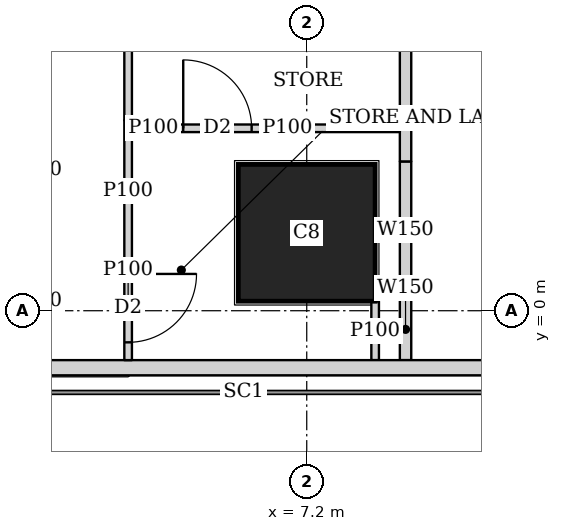
"""IFC4 building model, lengths in metres.
Left out: names, types, materials, properties, quantities, classifications, styles, units other than length and angle.
Written with IfcOpenShell. Run it as: python <this file> out.ifc"""

import sys

from ifc_helpers import new_model, si_unit, direction, frame, frame_2d, origin, origin_2d, place, context, subcontext, project, spatial, rectangle, extrude, element, fill, save


model = new_model("IFC4")
c1 = context("Model", 3, precision=1e-05, world=origin(), true_north=direction((0.0, 1.0)))
c2 = subcontext(c1, "Body", "Model", "MODEL_VIEW")
j1 = project(units=[si_unit("LENGTHUNIT", "METRE"), si_unit("PLANEANGLEUNIT", "RADIAN")], contexts=[c1])
p1 = place(None, origin())
s1 = spatial("IfcSite", under=j1, at=p1, CompositionType="ELEMENT")
p2 = place(p1, origin())
s2 = spatial("IfcBuilding", under=s1, at=p2, CompositionType="ELEMENT")
p3 = place(p2, frame((0.0, 0.0, 180.8)))
s3 = spatial("IfcBuildingStorey", under=s2, at=p3, CompositionType="ELEMENT", Elevation=180.8)
p4 = place(p3, frame((7.2, 1.025, 0.0), z_axis=(0.0, 0.0, 1.0), x_axis=(1.0, 0.0, 0.0)))
e1 = element("IfcColumn", 1, at=p4, inside=s3, PredefinedType="COLUMN", context=c2, shape_type="SweptSolid", body=[
    extrude(rectangle(XDim=1.8, YDim=1.8, at=origin_2d()), origin(), (0.0, 0.0, 1.0), 3.75),
])
p5 = place(p3, frame((2.163, -0.75, 0.0), z_axis=(0.0, 0.0, 1.0), x_axis=(1.0, 0.0, 0.0)))
e2 = element("IfcWall", 2, at=p5, inside=s3, PredefinedType="SOLIDWALL", context=c2, shape_type="SweptSolid", body=[
    extrude(rectangle(XDim=45.628, YDim=0.2, at=frame_2d((22.814, 0.0))), origin(), (0.0, 0.0, 1.0), 3.5),
])
p6 = place(p5, frame((9.537, 0.0, 0.9)))
e3 = element("IfcOpeningElement", 3, at=p6, cuts=e2, PredefinedType="OPENING", context=c2, shape_type="SweptSolid", body=[
    extrude(rectangle(XDim=1.8, YDim=1.5, at=frame_2d((0.9, 0.75))), frame((0.0, 0.11, 0.0), z_axis=(0.0, -1.0, 0.0), x_axis=(1.0, 0.0, 0.0)), (0.0, 0.0, 1.0), 0.22),
])
p7 = place(p5, frame((13.137, 0.0, 0.9)))
e4 = element("IfcOpeningElement", 4, at=p7, cuts=e2, PredefinedType="OPENING", context=c2, shape_type="SweptSolid", body=[
    extrude(rectangle(XDim=1.8, YDim=1.5, at=frame_2d((0.9, 0.75))), frame((0.0, 0.11, 0.0), z_axis=(0.0, -1.0, 0.0), x_axis=(1.0, 0.0, 0.0)), (0.0, 0.0, 1.0), 0.22),
])
p8 = place(p5, frame((16.737, 0.0, 0.9)))
e5 = element("IfcOpeningElement", 5, at=p8, cuts=e2, PredefinedType="OPENING", context=c2, shape_type="SweptSolid", body=[
    extrude(rectangle(XDim=1.8, YDim=1.5, at=frame_2d((0.9, 0.75))), frame((0.0, 0.11, 0.0), z_axis=(0.0, -1.0, 0.0), x_axis=(1.0, 0.0, 0.0)), (0.0, 0.0, 1.0), 0.22),
])
p9 = place(p5, frame((20.337, 0.0, 0.9)))
e6 = element("IfcOpeningElement", 6, at=p9, cuts=e2, PredefinedType="OPENING", context=c2, shape_type="SweptSolid", body=[
    extrude(rectangle(XDim=1.8, YDim=1.5, at=frame_2d((0.9, 0.75))), frame((0.0, 0.11, 0.0), z_axis=(0.0, -1.0, 0.0), x_axis=(1.0, 0.0, 0.0)), (0.0, 0.0, 1.0), 0.22),
])
p10 = place(p5, frame((23.937, 0.0, 0.9)))
e7 = element("IfcOpeningElement", 7, at=p10, cuts=e2, PredefinedType="OPENING", context=c2, shape_type="SweptSolid", body=[
    extrude(rectangle(XDim=1.8, YDim=1.5, at=frame_2d((0.9, 0.75))), frame((0.0, 0.11, 0.0), z_axis=(0.0, -1.0, 0.0), x_axis=(1.0, 0.0, 0.0)), (0.0, 0.0, 1.0), 0.22),
])
p11 = place(p5, frame((27.537, 0.0, 0.9)))
e8 = element("IfcOpeningElement", 8, at=p11, cuts=e2, PredefinedType="OPENING", context=c2, shape_type="SweptSolid", body=[
    extrude(rectangle(XDim=1.8, YDim=1.5, at=frame_2d((0.9, 0.75))), frame((0.0, 0.11, 0.0), z_axis=(0.0, -1.0, 0.0), x_axis=(1.0, 0.0, 0.0)), (0.0, 0.0, 1.0), 0.22),
])
p12 = place(p5, frame((31.137, 0.0, 0.9)))
e9 = element("IfcOpeningElement", 9, at=p12, cuts=e2, PredefinedType="OPENING", context=c2, shape_type="SweptSolid", body=[
    extrude(rectangle(XDim=1.8, YDim=1.5, at=frame_2d((0.9, 0.75))), frame((0.0, 0.11, 0.0), z_axis=(0.0, -1.0, 0.0), x_axis=(1.0, 0.0, 0.0)), (0.0, 0.0, 1.0), 0.22),
])
p13 = place(p5, frame((34.737, 0.0, 0.9)))
e10 = element("IfcOpeningElement", 10, at=p13, cuts=e2, PredefinedType="OPENING", context=c2, shape_type="SweptSolid", body=[
    extrude(rectangle(XDim=1.8, YDim=1.5, at=frame_2d((0.9, 0.75))), frame((0.0, 0.11, 0.0), z_axis=(0.0, -1.0, 0.0), x_axis=(1.0, 0.0, 0.0)), (0.0, 0.0, 1.0), 0.22),
])
p14 = place(p3, frame((8.5, -0.65, 0.0), z_axis=(0.0, 0.0, 1.0), x_axis=(0.0, 1.0, 0.0)))
e11 = element("IfcWall", 11, at=p14, inside=s3, PredefinedType="SOLIDWALL", context=c2, shape_type="SweptSolid", body=[
    extrude(rectangle(XDim=0.809, YDim=0.15, at=frame_2d((0.404, 0.0))), origin(), (0.0, 0.0, 1.0), 3.5),
])
p15 = place(p3, frame((8.5, 0.159, 0.0), z_axis=(0.0, 0.0, 1.0), x_axis=(0.0, 1.0, 0.0)))
e12 = element("IfcWall", 12, at=p15, inside=s3, PredefinedType="SOLIDWALL", context=c2, shape_type="SweptSolid", body=[
    extrude(rectangle(XDim=1.805, YDim=0.15, at=frame_2d((0.903, 0.0))), origin(), (0.0, 0.0, 1.0), 2.1),
])
p16 = place(p3, frame((8.5, 1.964, 0.0), z_axis=(0.0, 0.0, 1.0), x_axis=(0.0, 1.0, 0.0)))
e13 = element("IfcWall", 13, at=p16, inside=s3, PredefinedType="SOLIDWALL", context=c2, shape_type="SweptSolid", body=[
    extrude(rectangle(XDim=41.097, YDim=0.15, at=frame_2d((20.548, 0.0))), origin(), (0.0, 0.0, 1.0), 3.5),
])
p17 = place(p16, frame((10.661, 0.0, 0.0)))
e14 = element("IfcOpeningElement", 14, at=p17, cuts=e13, PredefinedType="OPENING", context=c2, shape_type="SweptSolid", body=[
    extrude(rectangle(XDim=1.0, YDim=2.1, at=frame_2d((0.5, 1.05))), frame((0.0, 0.085, 0.0), z_axis=(0.0, -1.0, 0.0), x_axis=(1.0, 0.0, 0.0)), (0.0, 0.0, 1.0), 0.17),
])
p18 = place(p16, frame((14.411, 0.0, 0.0)))
e15 = element("IfcOpeningElement", 15, at=p18, cuts=e13, PredefinedType="OPENING", context=c2, shape_type="SweptSolid", body=[
    extrude(rectangle(XDim=1.0, YDim=2.1, at=frame_2d((0.5, 1.05))), frame((0.0, 0.085, 0.0), z_axis=(0.0, -1.0, 0.0), x_axis=(1.0, 0.0, 0.0)), (0.0, 0.0, 1.0), 0.17),
])
p19 = place(p16, frame((21.911, 0.0, 0.0)))
e16 = element("IfcOpeningElement", 16, at=p19, cuts=e13, PredefinedType="OPENING", context=c2, shape_type="SweptSolid", body=[
    extrude(rectangle(XDim=1.0, YDim=2.1, at=frame_2d((0.5, 1.05))), frame((0.0, 0.085, 0.0), z_axis=(0.0, -1.0, 0.0), x_axis=(1.0, 0.0, 0.0)), (0.0, 0.0, 1.0), 0.17),
])
p20 = place(p16, frame((33.161, 0.0, 0.0)))
e17 = element("IfcOpeningElement", 17, at=p20, cuts=e13, PredefinedType="OPENING", context=c2, shape_type="SweptSolid", body=[
    extrude(rectangle(XDim=1.0, YDim=2.1, at=frame_2d((0.5, 1.05))), frame((0.0, 0.085, 0.0), z_axis=(0.0, -1.0, 0.0), x_axis=(1.0, 0.0, 0.0)), (0.0, 0.0, 1.0), 0.17),
])
p21 = place(p3, frame((8.1, 0.124, 0.0), z_axis=(0.0, 0.0, 1.0), x_axis=(0.0, -1.0, 0.0)))
e18 = element("IfcWall", 18, at=p21, inside=s3, PredefinedType="PARTITIONING", context=c2, shape_type="SweptSolid", body=[
    extrude(rectangle(XDim=0.774, YDim=0.1, at=frame_2d((0.387, 0.0))), origin(), (0.0, 0.0, 1.0), 3.5),
])
p22 = place(p3, frame((4.85, -0.65, 0.0), z_axis=(0.0, 0.0, 1.0), x_axis=(0.0, 1.0, 0.0)))
e19 = element("IfcWall", 19, at=p22, inside=s3, PredefinedType="PARTITIONING", context=c2, shape_type="SweptSolid", body=[
    extrude(rectangle(XDim=1.284, YDim=0.1, at=frame_2d((0.642, 0.0))), origin(), (0.0, 0.0, 1.0), 3.5),
])
p23 = place(p22, frame((0.234, 0.0, 0.0)))
e20 = element("IfcOpeningElement", 20, at=p23, cuts=e19, PredefinedType="OPENING", context=c2, shape_type="SweptSolid", body=[
    extrude(rectangle(XDim=0.9, YDim=2.1, at=frame_2d((0.45, 1.05))), frame((0.0, 0.06, 0.0), z_axis=(0.0, -1.0, 0.0), x_axis=(1.0, 0.0, 0.0)), (0.0, 0.0, 1.0), 0.12),
])
p24 = place(p3, frame((4.85, 0.634, 0.0), z_axis=(0.0, 0.0, 1.0), x_axis=(0.0, 1.0, 0.0)))
e21 = element("IfcWall", 21, at=p24, inside=s3, PredefinedType="PARTITIONING", context=c2, shape_type="SweptSolid", body=[
    extrude(rectangle(XDim=1.871, YDim=0.1, at=frame_2d((0.936, 0.0))), origin(), (0.0, 0.0, 1.0), 2.1),
])
p25 = place(p3, frame((4.85, 2.505, 0.0), z_axis=(0.0, 0.0, 1.0), x_axis=(0.0, 1.0, 0.0)))
e22 = element("IfcWall", 22, at=p25, inside=s3, PredefinedType="PARTITIONING", context=c2, shape_type="SweptSolid", body=[
    extrude(rectangle(XDim=8.745, YDim=0.1, at=frame_2d((4.373, 0.0))), origin(), (0.0, 0.0, 1.0), 3.5),
])
p26 = place(p25, frame((7.27, 0.0, 0.0)))
e23 = element("IfcOpeningElement", 23, at=p26, cuts=e22, PredefinedType="OPENING", context=c2, shape_type="SweptSolid", body=[
    extrude(rectangle(XDim=0.9, YDim=2.1, at=frame_2d((0.45, 1.05))), frame((0.0, 0.06, 0.0), z_axis=(0.0, -1.0, 0.0), x_axis=(1.0, 0.0, 0.0)), (0.0, 0.0, 1.0), 0.12),
])
p27 = place(p25, frame((3.745, 0.0, 0.0)))
e24 = element("IfcOpeningElement", 24, at=p27, cuts=e22, PredefinedType="OPENING", context=c2, shape_type="SweptSolid", body=[
    extrude(rectangle(XDim=0.9, YDim=2.1, at=frame_2d((0.45, 1.05))), frame((0.0, 0.06, 0.0), z_axis=(0.0, -1.0, 0.0), x_axis=(1.0, 0.0, 0.0)), (0.0, 0.0, 1.0), 0.12),
])
p28 = place(p25, frame((5.395, 0.0, 0.0)))
e25 = element("IfcOpeningElement", 25, at=p28, cuts=e22, PredefinedType="OPENING", context=c2, shape_type="SweptSolid", body=[
    extrude(rectangle(XDim=0.9, YDim=2.1, at=frame_2d((0.45, 1.05))), frame((0.0, 0.06, 0.0), z_axis=(0.0, -1.0, 0.0), x_axis=(1.0, 0.0, 0.0)), (0.0, 0.0, 1.0), 0.12),
])
p29 = place(p25, frame((1.87, 0.0, 0.0)))
e26 = element("IfcOpeningElement", 26, at=p29, cuts=e22, PredefinedType="OPENING", context=c2, shape_type="SweptSolid", body=[
    extrude(rectangle(XDim=0.9, YDim=2.1, at=frame_2d((0.45, 1.05))), frame((0.0, 0.06, 0.0), z_axis=(0.0, -1.0, 0.0), x_axis=(1.0, 0.0, 0.0)), (0.0, 0.0, 1.0), 0.12),
])
p30 = place(p3, frame((5.467, 2.4, 0.0), z_axis=(0.0, 0.0, 1.0), x_axis=(1.0, 0.0, 0.0)))
e27 = element("IfcWall", 27, at=p30, inside=s3, PredefinedType="PARTITIONING", context=c2, shape_type="SweptSolid", body=[
    extrude(rectangle(XDim=2.958, YDim=0.1, at=frame_2d((1.479, 0.0))), origin(), (0.0, 0.0, 1.0), 3.5),
])
p31 = place(p30, frame((0.108, 0.0, 0.0)))
e28 = element("IfcOpeningElement", 28, at=p31, cuts=e27, PredefinedType="OPENING", context=c2, shape_type="SweptSolid", body=[
    extrude(rectangle(XDim=0.9, YDim=2.1, at=frame_2d((0.45, 1.05))), frame((0.0, 0.06, 0.0), z_axis=(0.0, -1.0, 0.0), x_axis=(1.0, 0.0, 0.0)), (0.0, 0.0, 1.0), 0.12),
])
p32 = place(p3, frame((5.467, 2.4, 0.0), z_axis=(0.0, 0.0, 1.0), x_axis=(-1.0, 0.0, 0.0)))
e29 = element("IfcWall", 29, at=p32, inside=s3, PredefinedType="PARTITIONING", context=c2, shape_type="SweptSolid", body=[
    extrude(rectangle(XDim=0.567, YDim=0.1, at=frame_2d((0.284, 0.0))), origin(), (0.0, 0.0, 1.0), 2.1),
])
p33 = place(p23, origin())
e30 = element("IfcDoor", 30, at=p33, inside=s3, OperationType="SINGLE_SWING_LEFT", PredefinedType="DOOR", context=c2, shape_type="SweptSolid", body=[
    extrude(rectangle(XDim=0.9, YDim=2.1, at=frame_2d((0.45, 1.05))), frame((0.0, 0.025, 0.0), z_axis=(0.0, -1.0, 0.0), x_axis=(1.0, 0.0, 0.0)), (0.0, 0.0, 1.0), 0.05),
])
fill(e20, e30)
p34 = place(p31, origin())
e31 = element("IfcDoor", 31, at=p34, inside=s3, OperationType="SINGLE_SWING_LEFT", PredefinedType="DOOR", context=c2, shape_type="SweptSolid", body=[
    extrude(rectangle(XDim=0.9, YDim=2.1, at=frame_2d((0.45, 1.05))), frame((0.0, 0.025, 0.0), z_axis=(0.0, -1.0, 0.0), x_axis=(1.0, 0.0, 0.0)), (0.0, 0.0, 1.0), 0.05),
])
fill(e28, e31)
save(model, sys.argv[1])
